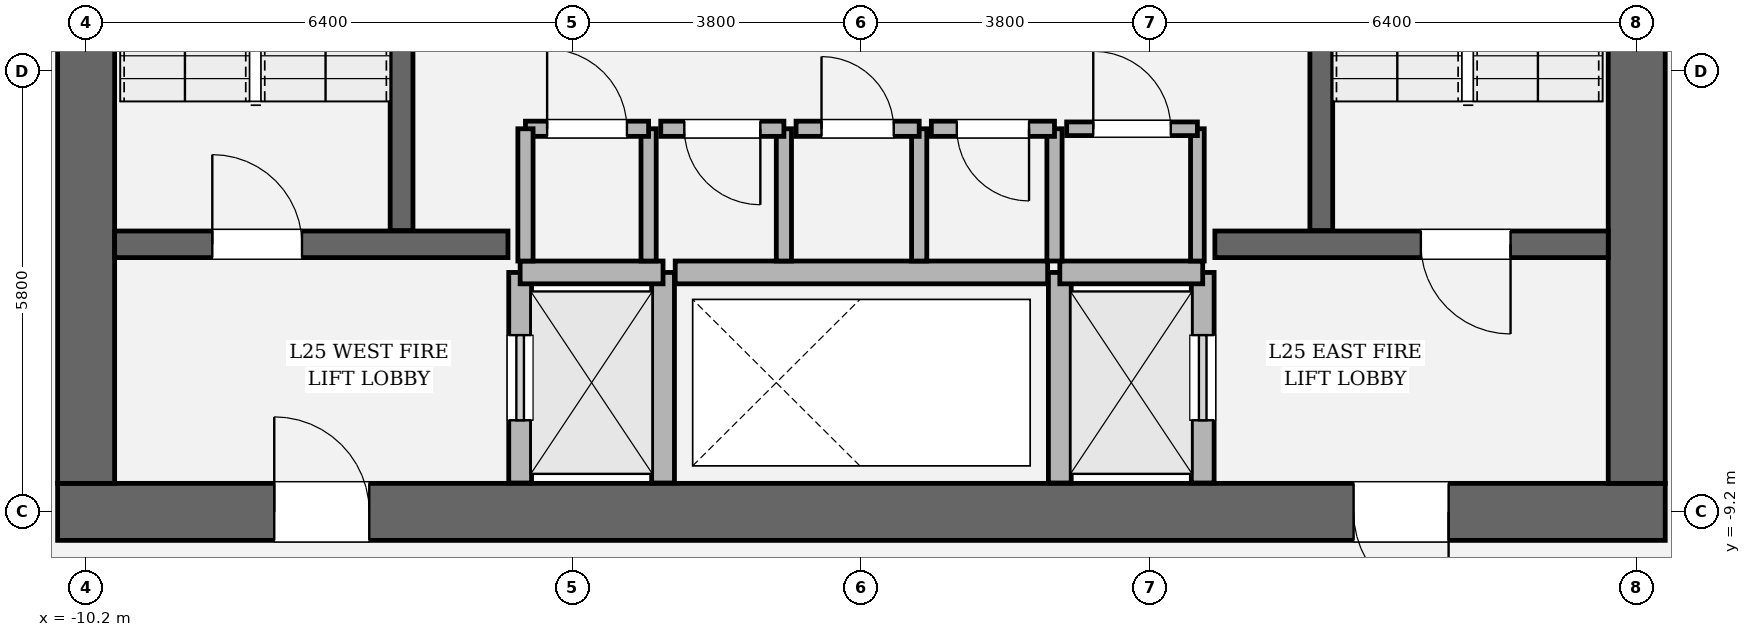
"""IFC4 building model, lengths in metres.
Left out: names, types, materials, properties, quantities, classifications, styles, units other than length and angle.
Written with IfcOpenShell. Run it as: python <this file> out.ifc"""

import sys

from ifc_helpers import new_model, si_unit, direction, frame, frame_2d, origin, place, context, subcontext, project, spatial, rectangle, extrude, element, fill, save


model = new_model("IFC4")
c1 = context("Model", 3, precision=1e-05, world=origin(), true_north=direction((0.0, 1.0)))
c2 = subcontext(c1, "Body", "Model", "MODEL_VIEW")
j1 = project(units=[si_unit("LENGTHUNIT", "METRE"), si_unit("PLANEANGLEUNIT", "RADIAN")], contexts=[c1])
p1 = place(None, origin())
s1 = spatial("IfcSite", under=j1, at=p1, CompositionType="ELEMENT")
p2 = place(p1, origin())
s2 = spatial("IfcBuilding", under=s1, at=p2, CompositionType="ELEMENT")
p3 = place(p2, frame((0.0, 0.0, 109.2)))
s3 = spatial("IfcBuildingStorey", under=s2, at=p3, CompositionType="ELEMENT", Elevation=109.2)
p4 = place(p3, frame((10.575, -9.2, 0.0), z_axis=(0.0, 0.0, 1.0), x_axis=(-1.0, 0.0, 0.0)))
e1 = element("IfcWall", 1, at=p4, inside=s3, PredefinedType="SHEAR", context=c2, shape_type="SweptSolid", body=[
    extrude(rectangle(XDim=21.15, YDim=0.75, at=frame_2d((10.575, 0.0))), origin(), (0.0, 0.0, 1.0), 4.05),
])
p5 = place(p4, frame((2.85, 0.0, 0.0)))
e2 = element("IfcOpeningElement", 2, at=p5, cuts=e1, PredefinedType="OPENING", context=c2, shape_type="SweptSolid", body=[
    extrude(rectangle(XDim=1.25, YDim=2.25, at=frame_2d((0.625, 1.125))), frame((0.0, 0.385, 0.0), z_axis=(0.0, -1.0, 0.0), x_axis=(1.0, 0.0, 0.0)), (0.0, 0.0, 1.0), 0.77),
])
p6 = place(p4, frame((17.05, 0.0, 0.0)))
e3 = element("IfcOpeningElement", 3, at=p6, cuts=e1, PredefinedType="OPENING", context=c2, shape_type="SweptSolid", body=[
    extrude(rectangle(XDim=1.25, YDim=2.25, at=frame_2d((0.625, 1.125))), frame((0.0, 0.385, 0.0), z_axis=(0.0, -1.0, 0.0), x_axis=(1.0, 0.0, 0.0)), (0.0, 0.0, 1.0), 0.77),
])
p7 = place(p3, frame((-10.2, -8.825, 0.0), z_axis=(0.0, 0.0, 1.0), x_axis=(0.0, 1.0, 0.0)))
e4 = element("IfcWall", 4, at=p7, inside=s3, PredefinedType="SHEAR", context=c2, shape_type="SweptSolid", body=[
    extrude(rectangle(XDim=17.65, YDim=0.75, at=frame_2d((8.825, 0.0))), origin(), (0.0, 0.0, 1.0), 4.05),
])
p8 = place(p7, frame((12.615, 0.0, 0.0)))
e5 = element("IfcOpeningElement", 5, at=p8, cuts=e4, PredefinedType="OPENING", context=c2, shape_type="SweptSolid", body=[
    extrude(rectangle(XDim=1.18, YDim=2.2, at=frame_2d((0.59, 1.1))), frame((0.0, 0.385, 0.0), z_axis=(0.0, -1.0, 0.0), x_axis=(1.0, 0.0, 0.0)), (0.0, 0.0, 1.0), 0.77),
])
p9 = place(p3, frame((10.2, 8.825, 0.0), z_axis=(0.0, 0.0, 1.0), x_axis=(0.0, -1.0, 0.0)))
e6 = element("IfcWall", 6, at=p9, inside=s3, PredefinedType="SHEAR", context=c2, shape_type="SweptSolid", body=[
    extrude(rectangle(XDim=17.65, YDim=0.75, at=frame_2d((8.825, 0.0))), origin(), (0.0, 0.0, 1.0), 4.05),
])
p10 = place(p9, frame((3.855, 0.0, 0.0)))
e7 = element("IfcOpeningElement", 7, at=p10, cuts=e6, PredefinedType="OPENING", context=c2, shape_type="SweptSolid", body=[
    extrude(rectangle(XDim=1.18, YDim=2.2, at=frame_2d((0.59, 1.1))), frame((0.0, 0.385, 0.0), z_axis=(0.0, -1.0, 0.0), x_axis=(1.0, 0.0, 0.0)), (0.0, 0.0, 1.0), 0.77),
])
for number, where, z_axis, x_axis in (
    (8, (-6.05, -5.5, 0.0), (0.0, 0.0, 1.0), (0.0, 1.0, 0.0)),
    (9, (6.05, 3.45, 0.0), (0.0, 0.0, 1.0), (0.0, -1.0, 0.0)),
):
    element("IfcWall", number, at=place(p3, frame(where, z_axis=z_axis, x_axis=x_axis)), inside=s3, PredefinedType="SOLIDWALL", context=c2, shape_type="SweptSolid", body=[
        extrude(rectangle(XDim=8.95, YDim=0.3, at=frame_2d((4.475, 0.0))), origin(), (0.0, 0.0, 1.0), 4.05),
    ])
p11 = place(p3, frame((-9.825, -5.68, 0.0), z_axis=(0.0, 0.0, 1.0), x_axis=(1.0, 0.0, 0.0)))
e10 = element("IfcWall", 10, at=p11, inside=s3, PredefinedType="SOLIDWALL", context=c2, shape_type="SweptSolid", body=[
    extrude(rectangle(XDim=5.175, YDim=0.35, at=frame_2d((2.587, 0.0))), origin(), (0.0, 0.0, 1.0), 4.05),
])
p12 = place(p11, frame((1.285, 0.0, 0.0)))
e11 = element("IfcOpeningElement", 11, at=p12, cuts=e10, PredefinedType="OPENING", context=c2, shape_type="SweptSolid", body=[
    extrude(rectangle(XDim=1.18, YDim=2.2, at=frame_2d((0.59, 1.1))), frame((0.0, 0.185, 0.0), z_axis=(0.0, -1.0, 0.0), x_axis=(1.0, 0.0, 0.0)), (0.0, 0.0, 1.0), 0.37),
])
p13 = place(p3, frame((4.65, -5.68, 0.0), z_axis=(0.0, 0.0, 1.0), x_axis=(1.0, 0.0, 0.0)))
e12 = element("IfcWall", 12, at=p13, inside=s3, PredefinedType="SOLIDWALL", context=c2, shape_type="SweptSolid", body=[
    extrude(rectangle(XDim=5.175, YDim=0.35, at=frame_2d((2.587, 0.0))), origin(), (0.0, 0.0, 1.0), 4.05),
])
p14 = place(p13, frame((2.71, 0.0, 0.0)))
e13 = element("IfcOpeningElement", 13, at=p14, cuts=e12, PredefinedType="OPENING", context=c2, shape_type="SweptSolid", body=[
    extrude(rectangle(XDim=1.18, YDim=2.2, at=frame_2d((0.59, 1.1))), frame((0.0, 0.185, 0.0), z_axis=(0.0, -1.0, 0.0), x_axis=(1.0, 0.0, 0.0)), (0.0, 0.0, 1.0), 0.37),
])
p15 = place(p3, frame((-4.49, -8.82, 0.0), z_axis=(0.0, 0.0, 1.0), x_axis=(0.0, 1.0, 0.0)))
e14 = element("IfcWall", 14, at=p15, inside=s3, PredefinedType="SOLIDWALL", context=c2, shape_type="SweptSolid", body=[
    extrude(rectangle(XDim=2.77, YDim=0.3, at=frame_2d((1.385, 0.0))), origin(), (0.0, 0.0, 1.0), 3.81),
])
p16 = place(p15, frame((0.825, 0.0, 0.0)))
e15 = element("IfcOpeningElement", 15, at=p16, cuts=e14, PredefinedType="OPENING", context=c2, shape_type="SweptSolid", body=[
    extrude(rectangle(XDim=1.12, YDim=2.25, at=frame_2d((0.56, 1.125))), frame((0.0, 0.16, 0.0), z_axis=(0.0, -1.0, 0.0), x_axis=(1.0, 0.0, 0.0)), (0.0, 0.0, 1.0), 0.32),
])
p17 = place(p3, frame((-2.61, -8.82, 0.0), z_axis=(0.0, 0.0, 1.0), x_axis=(0.0, 1.0, 0.0)))
e16 = element("IfcWall", 16, at=p17, inside=s3, PredefinedType="SOLIDWALL", context=c2, shape_type="SweptSolid", body=[
    extrude(rectangle(XDim=2.77, YDim=0.3, at=frame_2d((1.385, 0.0))), origin(), (0.0, 0.0, 1.0), 3.81),
])
p18 = place(p3, frame((-4.49, -6.05, 0.0), z_axis=(0.0, 0.0, 1.0), x_axis=(1.0, 0.0, 0.0)))
e17 = element("IfcWall", 17, at=p18, inside=s3, PredefinedType="SOLIDWALL", context=c2, shape_type="SweptSolid", body=[
    extrude(rectangle(XDim=1.88, YDim=0.3, at=frame_2d((0.94, 0.0))), origin(), (0.0, 0.0, 1.0), 3.81),
])
p19 = place(p3, frame((4.49, -8.82, 0.0), z_axis=(0.0, 0.0, 1.0), x_axis=(0.0, 1.0, 0.0)))
e18 = element("IfcWall", 18, at=p19, inside=s3, PredefinedType="SOLIDWALL", context=c2, shape_type="SweptSolid", body=[
    extrude(rectangle(XDim=2.77, YDim=0.3, at=frame_2d((1.385, 0.0))), origin(), (0.0, 0.0, 1.0), 3.81),
])
p20 = place(p19, frame((0.825, 0.0, 0.0)))
e19 = element("IfcOpeningElement", 19, at=p20, cuts=e18, PredefinedType="OPENING", context=c2, shape_type="SweptSolid", body=[
    extrude(rectangle(XDim=1.12, YDim=2.25, at=frame_2d((0.56, 1.125))), frame((0.0, 0.16, 0.0), z_axis=(0.0, -1.0, 0.0), x_axis=(1.0, 0.0, 0.0)), (0.0, 0.0, 1.0), 0.32),
])
p21 = place(p3, frame((2.61, -8.82, 0.0), z_axis=(0.0, 0.0, 1.0), x_axis=(0.0, 1.0, 0.0)))
e20 = element("IfcWall", 20, at=p21, inside=s3, PredefinedType="SOLIDWALL", context=c2, shape_type="SweptSolid", body=[
    extrude(rectangle(XDim=2.77, YDim=0.3, at=frame_2d((1.385, 0.0))), origin(), (0.0, 0.0, 1.0), 3.81),
])
p22 = place(p3, frame((2.61, -6.05, 0.0), z_axis=(0.0, 0.0, 1.0), x_axis=(1.0, 0.0, 0.0)))
e21 = element("IfcWall", 21, at=p22, inside=s3, PredefinedType="SOLIDWALL", context=c2, shape_type="SweptSolid", body=[
    extrude(rectangle(XDim=1.88, YDim=0.3, at=frame_2d((0.94, 0.0))), origin(), (0.0, 0.0, 1.0), 3.81),
])
p23 = place(p3, frame((-2.45, -6.05, 0.0), z_axis=(0.0, 0.0, 1.0), x_axis=(1.0, 0.0, 0.0)))
e22 = element("IfcWall", 22, at=p23, inside=s3, PredefinedType="SOLIDWALL", context=c2, shape_type="SweptSolid", body=[
    extrude(rectangle(XDim=4.9, YDim=0.3, at=frame_2d((2.45, 0.0))), origin(), (0.0, 0.0, 1.0), 3.81),
])
p24 = place(p3, frame((-2.8, -5.9, 0.0), z_axis=(0.0, 0.0, 1.0), x_axis=(0.0, 1.0, 0.0)))
e23 = element("IfcWall", 23, at=p24, inside=s3, PredefinedType="SOLIDWALL", context=c2, shape_type="SweptSolid", body=[
    extrude(rectangle(XDim=1.74, YDim=0.2, at=frame_2d((0.87, 0.0))), origin(), (0.0, 0.0, 1.0), 3.81),
])
p25 = place(p3, frame((-2.8, -4.16, 0.0), z_axis=(0.0, 0.0, 1.0), x_axis=(-1.0, 0.0, 0.0)))
e24 = element("IfcWall", 24, at=p25, inside=s3, PredefinedType="SOLIDWALL", context=c2, shape_type="SweptSolid", body=[
    extrude(rectangle(XDim=1.62, YDim=0.2, at=frame_2d((0.81, 0.0))), origin(), (0.0, 0.0, 1.0), 3.81),
])
p26 = place(p25, frame((0.285, 0.0, 0.0)))
e25 = element("IfcOpeningElement", 25, at=p26, cuts=e24, PredefinedType="OPENING", context=c2, shape_type="SweptSolid", body=[
    extrude(rectangle(XDim=1.05, YDim=2.2, at=frame_2d((0.525, 1.1))), frame((0.0, 0.11, 0.0), z_axis=(0.0, -1.0, 0.0), x_axis=(1.0, 0.0, 0.0)), (0.0, 0.0, 1.0), 0.22),
])
for number, where, z_axis, x_axis in (
    (26, (-4.42, -4.16, 0.0), (0.0, 0.0, 1.0), (0.0, -1.0, 0.0)),
    (27, (-1.02, -5.9, 0.0), (0.0, 0.0, 1.0), (0.0, 1.0, 0.0)),
):
    element("IfcWall", number, at=place(p3, frame(where, z_axis=z_axis, x_axis=x_axis)), inside=s3, PredefinedType="SOLIDWALL", context=c2, shape_type="SweptSolid", body=[
        extrude(rectangle(XDim=1.74, YDim=0.2, at=frame_2d((0.87, 0.0))), origin(), (0.0, 0.0, 1.0), 3.81),
    ])
p27 = place(p3, frame((-1.02, -4.16, 0.0), z_axis=(0.0, 0.0, 1.0), x_axis=(-1.0, 0.0, 0.0)))
e28 = element("IfcWall", 28, at=p27, inside=s3, PredefinedType="SOLIDWALL", context=c2, shape_type="SweptSolid", body=[
    extrude(rectangle(XDim=1.62, YDim=0.2, at=frame_2d((0.81, 0.0))), origin(), (0.0, 0.0, 1.0), 3.81),
])
p28 = place(p27, frame((0.31, 0.0, 0.0)))
e29 = element("IfcOpeningElement", 29, at=p28, cuts=e28, PredefinedType="OPENING", context=c2, shape_type="SweptSolid", body=[
    extrude(rectangle(XDim=1.0, YDim=2.15, at=frame_2d((0.5, 1.075))), frame((0.0, 0.11, 0.0), z_axis=(0.0, -1.0, 0.0), x_axis=(1.0, 0.0, 0.0)), (0.0, 0.0, 1.0), 0.22),
])
p29 = place(p3, frame((0.76, -5.9, 0.0), z_axis=(0.0, 0.0, 1.0), x_axis=(0.0, 1.0, 0.0)))
e30 = element("IfcWall", 30, at=p29, inside=s3, PredefinedType="SOLIDWALL", context=c2, shape_type="SweptSolid", body=[
    extrude(rectangle(XDim=1.74, YDim=0.2, at=frame_2d((0.87, 0.0))), origin(), (0.0, 0.0, 1.0), 3.81),
])
p30 = place(p3, frame((0.76, -4.16, 0.0), z_axis=(0.0, 0.0, 1.0), x_axis=(-1.0, 0.0, 0.0)))
e31 = element("IfcWall", 31, at=p30, inside=s3, PredefinedType="SOLIDWALL", context=c2, shape_type="SweptSolid", body=[
    extrude(rectangle(XDim=1.62, YDim=0.2, at=frame_2d((0.81, 0.0))), origin(), (0.0, 0.0, 1.0), 3.81),
])
p31 = place(p30, frame((0.335, 0.0, 0.0)))
e32 = element("IfcOpeningElement", 32, at=p31, cuts=e31, PredefinedType="OPENING", context=c2, shape_type="SweptSolid", body=[
    extrude(rectangle(XDim=0.95, YDim=2.15, at=frame_2d((0.475, 1.075))), frame((0.0, 0.11, 0.0), z_axis=(0.0, -1.0, 0.0), x_axis=(1.0, 0.0, 0.0)), (0.0, 0.0, 1.0), 0.22),
])
p32 = place(p3, frame((2.54, -5.9, 0.0), z_axis=(0.0, 0.0, 1.0), x_axis=(0.0, 1.0, 0.0)))
e33 = element("IfcWall", 33, at=p32, inside=s3, PredefinedType="SOLIDWALL", context=c2, shape_type="SweptSolid", body=[
    extrude(rectangle(XDim=1.74, YDim=0.2, at=frame_2d((0.87, 0.0))), origin(), (0.0, 0.0, 1.0), 3.81),
])
p33 = place(p3, frame((2.54, -4.16, 0.0), z_axis=(0.0, 0.0, 1.0), x_axis=(-1.0, 0.0, 0.0)))
e34 = element("IfcWall", 34, at=p33, inside=s3, PredefinedType="SOLIDWALL", context=c2, shape_type="SweptSolid", body=[
    extrude(rectangle(XDim=1.62, YDim=0.2, at=frame_2d((0.81, 0.0))), origin(), (0.0, 0.0, 1.0), 3.81),
])
p34 = place(p33, frame((0.335, 0.0, 0.0)))
e35 = element("IfcOpeningElement", 35, at=p34, cuts=e34, PredefinedType="OPENING", context=c2, shape_type="SweptSolid", body=[
    extrude(rectangle(XDim=0.95, YDim=2.15, at=frame_2d((0.475, 1.075))), frame((0.0, 0.11, 0.0), z_axis=(0.0, -1.0, 0.0), x_axis=(1.0, 0.0, 0.0)), (0.0, 0.0, 1.0), 0.22),
])
p35 = place(p3, frame((4.42, -5.9, 0.0), z_axis=(0.0, 0.0, 1.0), x_axis=(0.0, 1.0, 0.0)))
e36 = element("IfcWall", 36, at=p35, inside=s3, PredefinedType="PARTITIONING", context=c2, shape_type="SweptSolid", body=[
    extrude(rectangle(XDim=1.74, YDim=0.18, at=frame_2d((0.87, 0.0))), origin(), (0.0, 0.0, 1.0), 3.81),
])
p36 = place(p3, frame((4.42, -4.16, 0.0), z_axis=(0.0, 0.0, 1.0), x_axis=(-1.0, 0.0, 0.0)))
e37 = element("IfcWall", 37, at=p36, inside=s3, PredefinedType="PARTITIONING", context=c2, shape_type="SweptSolid", body=[
    extrude(rectangle(XDim=1.72, YDim=0.18, at=frame_2d((0.86, 0.0))), origin(), (0.0, 0.0, 1.0), 3.81),
])
p37 = place(p36, frame((0.35, 0.0, 0.0)))
e38 = element("IfcOpeningElement", 38, at=p37, cuts=e37, PredefinedType="OPENING", context=c2, shape_type="SweptSolid", body=[
    extrude(rectangle(XDim=1.02, YDim=2.2, at=frame_2d((0.51, 1.1))), frame((0.0, 0.1, 0.0), z_axis=(0.0, -1.0, 0.0), x_axis=(1.0, 0.0, 0.0)), (0.0, 0.0, 1.0), 0.2),
])
p38 = place(p12, origin())
e39 = element("IfcDoor", 39, at=p38, inside=s3, OperationType="SINGLE_SWING_LEFT", PredefinedType="DOOR", context=c2, shape_type="SweptSolid", body=[
    extrude(rectangle(XDim=1.18, YDim=2.2, at=frame_2d((0.59, 1.1))), frame((0.0, 0.025, 0.0), z_axis=(0.0, -1.0, 0.0), x_axis=(1.0, 0.0, 0.0)), (0.0, 0.0, 1.0), 0.05),
])
fill(e11, e39)
p39 = place(p14, origin())
e40 = element("IfcDoor", 40, at=p39, inside=s3, OperationType="SINGLE_SWING_RIGHT", PredefinedType="DOOR", context=c2, shape_type="SweptSolid", body=[
    extrude(rectangle(XDim=1.18, YDim=2.2, at=frame_2d((0.59, 1.1))), frame((0.0, 0.025, 0.0), z_axis=(0.0, -1.0, 0.0), x_axis=(1.0, 0.0, 0.0)), (0.0, 0.0, 1.0), 0.05),
])
fill(e13, e40)
p40 = place(p5, origin())
e41 = element("IfcDoor", 41, at=p40, inside=s3, OperationType="SINGLE_SWING_LEFT", PredefinedType="DOOR", context=c2, shape_type="SweptSolid", body=[
    extrude(rectangle(XDim=1.25, YDim=2.25, at=frame_2d((0.625, 1.125))), frame((0.0, 0.025, 0.0), z_axis=(0.0, -1.0, 0.0), x_axis=(1.0, 0.0, 0.0)), (0.0, 0.0, 1.0), 0.05),
])
fill(e2, e41)
p41 = place(p6, origin())
e42 = element("IfcDoor", 42, at=p41, inside=s3, OperationType="SINGLE_SWING_RIGHT", PredefinedType="DOOR", context=c2, shape_type="SweptSolid", body=[
    extrude(rectangle(XDim=1.25, YDim=2.25, at=frame_2d((0.625, 1.125))), frame((0.0, 0.025, 0.0), z_axis=(0.0, -1.0, 0.0), x_axis=(1.0, 0.0, 0.0)), (0.0, 0.0, 1.0), 0.05),
])
fill(e3, e42)
p42 = place(p16, origin())
e43 = element("IfcDoor", 43, at=p42, inside=s3, OperationType="SLIDING_TO_LEFT", PredefinedType="DOOR", context=c2, shape_type="SweptSolid", body=[
    extrude(rectangle(XDim=1.12, YDim=2.25, at=frame_2d((0.56, 1.125))), frame((0.0, 0.025, 0.0), z_axis=(0.0, -1.0, 0.0), x_axis=(1.0, 0.0, 0.0)), (0.0, 0.0, 1.0), 0.05),
])
fill(e15, e43)
p43 = place(p20, origin())
e44 = element("IfcDoor", 44, at=p43, inside=s3, OperationType="SLIDING_TO_RIGHT", PredefinedType="DOOR", context=c2, shape_type="SweptSolid", body=[
    extrude(rectangle(XDim=1.12, YDim=2.25, at=frame_2d((0.56, 1.125))), frame((0.0, 0.025, 0.0), z_axis=(0.0, -1.0, 0.0), x_axis=(1.0, 0.0, 0.0)), (0.0, 0.0, 1.0), 0.05),
])
fill(e19, e44)
p44 = place(p26, origin())
e45 = element("IfcDoor", 45, at=p44, inside=s3, OperationType="SINGLE_SWING_RIGHT", PredefinedType="DOOR", context=c2, shape_type="SweptSolid", body=[
    extrude(rectangle(XDim=1.05, YDim=2.2, at=frame_2d((0.525, 1.1))), frame((0.0, 0.025, 0.0), z_axis=(0.0, -1.0, 0.0), x_axis=(1.0, 0.0, 0.0)), (0.0, 0.0, 1.0), 0.05),
])
fill(e25, e45)
p45 = place(p28, origin())
e46 = element("IfcDoor", 46, at=p45, inside=s3, OperationType="SINGLE_SWING_LEFT", PredefinedType="DOOR", context=c2, shape_type="SweptSolid", body=[
    extrude(rectangle(XDim=1.0, YDim=2.15, at=frame_2d((0.5, 1.075))), frame((0.0, 0.025, 0.0), z_axis=(0.0, -1.0, 0.0), x_axis=(1.0, 0.0, 0.0)), (0.0, 0.0, 1.0), 0.05),
])
fill(e29, e46)
p46 = place(p31, origin())
e47 = element("IfcDoor", 47, at=p46, inside=s3, OperationType="SINGLE_SWING_RIGHT", PredefinedType="DOOR", context=c2, shape_type="SweptSolid", body=[
    extrude(rectangle(XDim=0.95, YDim=2.15, at=frame_2d((0.475, 1.075))), frame((0.0, 0.025, 0.0), z_axis=(0.0, -1.0, 0.0), x_axis=(1.0, 0.0, 0.0)), (0.0, 0.0, 1.0), 0.05),
])
fill(e32, e47)
p47 = place(p34, origin())
e48 = element("IfcDoor", 48, at=p47, inside=s3, OperationType="SINGLE_SWING_LEFT", PredefinedType="DOOR", context=c2, shape_type="SweptSolid", body=[
    extrude(rectangle(XDim=0.95, YDim=2.15, at=frame_2d((0.475, 1.075))), frame((0.0, 0.025, 0.0), z_axis=(0.0, -1.0, 0.0), x_axis=(1.0, 0.0, 0.0)), (0.0, 0.0, 1.0), 0.05),
])
fill(e35, e48)
p48 = place(p37, origin())
e49 = element("IfcDoor", 49, at=p48, inside=s3, OperationType="SINGLE_SWING_RIGHT", PredefinedType="DOOR", context=c2, shape_type="SweptSolid", body=[
    extrude(rectangle(XDim=1.02, YDim=2.2, at=frame_2d((0.51, 1.1))), frame((0.0, 0.025, 0.0), z_axis=(0.0, -1.0, 0.0), x_axis=(1.0, 0.0, 0.0)), (0.0, 0.0, 1.0), 0.05),
])
fill(e38, e49)
save(model, sys.argv[1])
